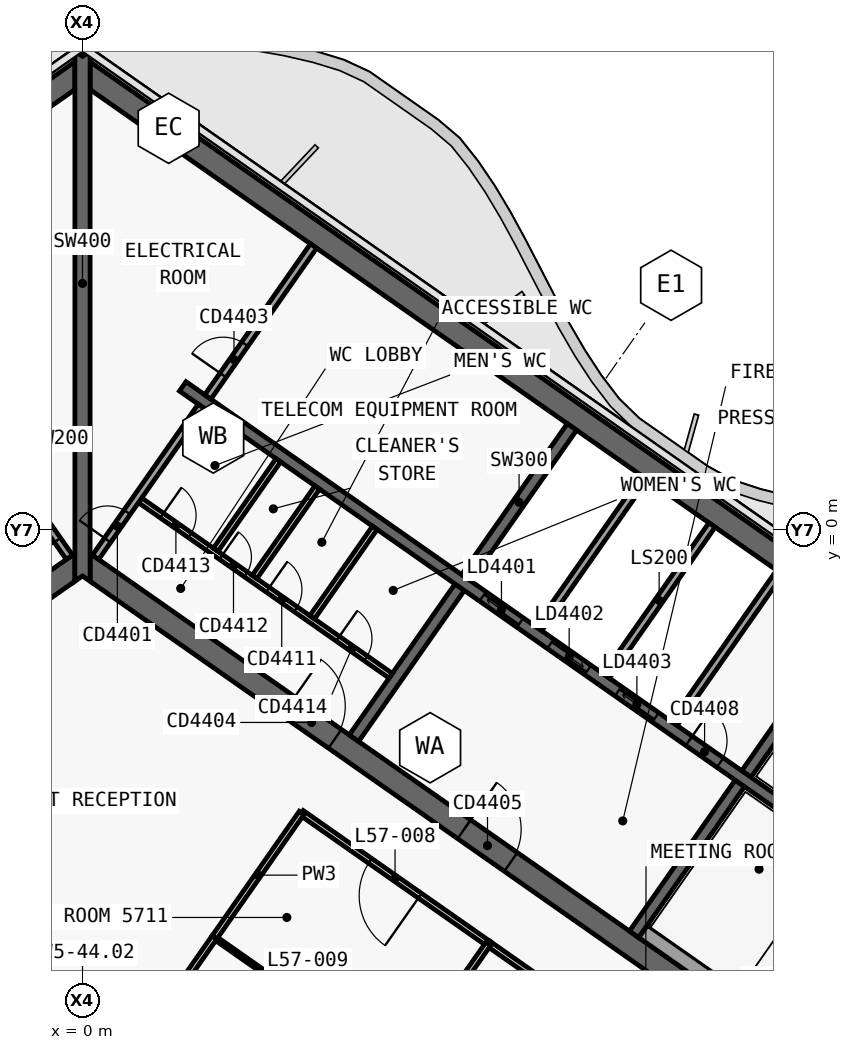
"""IFC4 building model, lengths in metres.
Left out: names, types, materials, properties, quantities, classifications, styles, units other than length and angle.
Written with IfcOpenShell. Run it as: python <this file> out.ifc"""

import sys

from ifc_helpers import new_model, si_unit, direction, frame, frame_2d, origin, place, context, subcontext, project, spatial, polyline, rectangle, outline, extrude, element, fill, save


model = new_model("IFC4")
c1 = context("Model", 3, precision=1e-05, world=origin(), true_north=direction((0.0, 1.0)))
c2 = subcontext(c1, "Body", "Model", "MODEL_VIEW")
j1 = project(units=[si_unit("LENGTHUNIT", "METRE"), si_unit("PLANEANGLEUNIT", "RADIAN")], contexts=[c1])
p1 = place(None, origin())
s1 = spatial("IfcSite", under=j1, at=p1, CompositionType="ELEMENT")
p2 = place(p1, origin())
s2 = spatial("IfcBuilding", under=s1, at=p2, CompositionType="ELEMENT")
p3 = place(p2, frame((0.0, 0.0, 244.9)))
s3 = spatial("IfcBuildingStorey", under=s2, at=p3, CompositionType="ELEMENT", Elevation=244.9)
p4 = place(p3, frame((-0.028, 12.066, 0.0), z_axis=(0.0, 0.0, 1.0), x_axis=(-0.819151382952, -0.573577380837, 0.0)))
e1 = element("IfcWall", 1, at=p4, inside=s3, PredefinedType="SHEAR", context=c2, shape_type="SweptSolid", body=[
    extrude(outline(polyline([(33.898, 0.3), (0.42, 0.3), (0.0, -0.3), (33.898, -0.3), (33.898, 0.3)])), origin(), (0.0, 0.0, 1.0), 3.9),
])
p5 = place(p3, frame((-0.028, -0.874, 0.0), z_axis=(0.0, 0.0, 1.0), x_axis=(-0.819150035022, -0.573579305871, 0.0)))
e2 = element("IfcWall", 2, at=p5, inside=s3, PredefinedType="SHEAR", context=c2, shape_type="SweptSolid", body=[
    extrude(outline(polyline([(26.476, 0.3), (0.42, 0.3), (0.0, -0.3), (26.476, -0.3), (26.476, 0.3)])), origin(), (0.0, 0.0, 1.0), 3.9),
])
p6 = place(p5, frame((2.976, 0.0, 0.0)))
e3 = element("IfcOpeningElement", 3, at=p6, cuts=e2, PredefinedType="OPENING", context=c2, shape_type="SweptSolid", body=[
    extrude(rectangle(XDim=2.4, YDim=2.1, at=frame_2d((1.2, 1.05))), frame((0.0, 0.31, 0.0), z_axis=(0.0, -1.0, 0.0), x_axis=(1.0, 0.0, 0.0)), (0.0, 0.0, 1.0), 0.62),
])
p7 = place(p5, frame((11.776, 0.0, 0.0)))
e4 = element("IfcOpeningElement", 4, at=p7, cuts=e2, PredefinedType="OPENING", context=c2, shape_type="SweptSolid", body=[
    extrude(rectangle(XDim=2.4, YDim=2.1, at=frame_2d((1.2, 1.05))), frame((0.0, 0.31, 0.0), z_axis=(0.0, -1.0, 0.0), x_axis=(1.0, 0.0, 0.0)), (0.0, 0.0, 1.0), 0.62),
])
p8 = place(p3, frame((0.028, 12.066, 0.0), z_axis=(0.0, 0.0, 1.0), x_axis=(0.819151382952, -0.573577380837, 0.0)))
e5 = element("IfcWall", 5, at=p8, inside=s3, PredefinedType="SHEAR", context=c2, shape_type="SweptSolid", body=[
    extrude(outline(polyline([(33.898, 0.3), (0.0, 0.3), (0.42, -0.3), (33.898, -0.3), (33.898, 0.3)])), origin(), (0.0, 0.0, 1.0), 3.9),
])
p9 = place(p3, frame((0.028, -0.874, 0.0), z_axis=(0.0, 0.0, 1.0), x_axis=(0.819150035022, -0.573579305871, 0.0)))
e6 = element("IfcWall", 6, at=p9, inside=s3, PredefinedType="SHEAR", context=c2, shape_type="SweptSolid", body=[
    extrude(outline(polyline([(26.476, 0.3), (0.0, 0.3), (0.42, -0.3), (26.476, -0.3), (26.476, 0.3)])), origin(), (0.0, 0.0, 1.0), 3.9),
])
p10 = place(p9, frame((6.576, 0.0, 0.0)))
e7 = element("IfcOpeningElement", 7, at=p10, cuts=e6, PredefinedType="OPENING", context=c2, shape_type="SweptSolid", body=[
    extrude(rectangle(XDim=1.5, YDim=2.1, at=frame_2d((0.75, 1.05))), frame((0.0, 0.31, 0.0), z_axis=(0.0, -1.0, 0.0), x_axis=(1.0, 0.0, 0.0)), (0.0, 0.0, 1.0), 0.62),
])
p11 = place(p9, frame((12.226, 0.0, 0.0)))
e8 = element("IfcOpeningElement", 8, at=p11, cuts=e6, PredefinedType="OPENING", context=c2, shape_type="SweptSolid", body=[
    extrude(rectangle(XDim=1.5, YDim=2.1, at=frame_2d((0.75, 1.05))), frame((0.0, 0.31, 0.0), z_axis=(0.0, -1.0, 0.0), x_axis=(1.0, 0.0, 0.0)), (0.0, 0.0, 1.0), 0.62),
])
p12 = place(p3, frame((7.143, -5.49, 0.0), z_axis=(0.0, 0.0, 1.0), x_axis=(0.573617744349, 0.819123118565, 0.0)))
e9 = element("IfcWall", 9, at=p12, inside=s3, PredefinedType="SHEAR", context=c2, shape_type="SweptSolid", body=[
    extrude(outline(polyline([(0.0, 0.15), (0.0, -0.15), (4.85, -0.15), (4.85, 0.15), (0.0, 0.15)])), origin(), (0.0, 0.0, 1.0), 3.9),
])
p13 = place(p3, frame((10.097, -1.271, 0.0), z_axis=(0.0, 0.0, 1.0), x_axis=(0.573560315113, 0.819163332265, 0.0)))
e10 = element("IfcWall", 10, at=p13, inside=s3, PredefinedType="SHEAR", context=c2, shape_type="SweptSolid", body=[
    extrude(outline(polyline([(4.85, -0.15), (4.85, 0.15), (0.0, 0.15), (0.0, -0.15), (4.85, -0.15)])), origin(), (0.0, 0.0, 1.0), 3.9),
])
p14 = place(p3, frame((14.515, -10.652, 0.0), z_axis=(0.0, 0.0, 1.0), x_axis=(0.573560315113, 0.819163332265, 0.0)))
e11 = element("IfcWall", 11, at=p14, inside=s3, PredefinedType="SHEAR", context=c2, shape_type="SweptSolid", body=[
    extrude(outline(polyline([(0.0, 0.15), (0.0, -0.15), (4.85, -0.15), (4.85, 0.15), (0.0, 0.15)])), origin(), (0.0, 0.0, 1.0), 3.9),
])
p15 = place(p3, frame((17.469, -6.433, 0.0), z_axis=(0.0, 0.0, 1.0), x_axis=(0.573594092424, 0.81913968109, 0.0)))
e12 = element("IfcWall", 12, at=p15, inside=s3, PredefinedType="SHEAR", context=c2, shape_type="SweptSolid", body=[
    extrude(outline(polyline([(4.85, -0.15), (4.85, 0.15), (0.0, 0.15), (0.0, -0.15), (4.85, -0.15)])), origin(), (0.0, 0.0, 1.0), 3.9),
])
p16 = place(p3, frame((2.638, 3.768, 0.0), z_axis=(0.0, 0.0, 1.0), x_axis=(0.819155014212, -0.573572194837, 0.0)))
e13 = element("IfcWall", 13, at=p16, inside=s3, PredefinedType="SHEAR", context=c2, shape_type="SweptSolid", body=[
    extrude(outline(polyline([(0.0, 0.15), (0.0, -0.15), (26.4, -0.15), (26.4, 0.15), (0.0, 0.15)])), origin(), (0.0, 0.0, 1.0), 3.9),
])
p17 = place(p16, frame((9.637, 0.0, 0.0)))
e14 = element("IfcOpeningElement", 14, at=p17, cuts=e13, PredefinedType="OPENING", context=c2, shape_type="SweptSolid", body=[
    extrude(rectangle(XDim=1.2, YDim=2.1, at=frame_2d((0.6, 1.05))), frame((0.0, 0.16, 0.0), z_axis=(0.0, -1.0, 0.0), x_axis=(1.0, 0.0, 0.0)), (0.0, 0.0, 1.0), 0.32),
])
p18 = place(p16, frame((11.812, 0.0, 0.0)))
e15 = element("IfcOpeningElement", 15, at=p18, cuts=e13, PredefinedType="OPENING", context=c2, shape_type="SweptSolid", body=[
    extrude(rectangle(XDim=1.2, YDim=2.1, at=frame_2d((0.6, 1.05))), frame((0.0, 0.16, 0.0), z_axis=(0.0, -1.0, 0.0), x_axis=(1.0, 0.0, 0.0)), (0.0, 0.0, 1.0), 0.32),
])
p19 = place(p16, frame((13.988, 0.0, 0.0)))
e16 = element("IfcOpeningElement", 16, at=p19, cuts=e13, PredefinedType="OPENING", context=c2, shape_type="SweptSolid", body=[
    extrude(rectangle(XDim=1.2, YDim=2.1, at=frame_2d((0.6, 1.05))), frame((0.0, 0.16, 0.0), z_axis=(0.0, -1.0, 0.0), x_axis=(1.0, 0.0, 0.0)), (0.0, 0.0, 1.0), 0.32),
])
p20 = place(p16, frame((16.262, 0.0, 0.0)))
e17 = element("IfcOpeningElement", 17, at=p20, cuts=e13, PredefinedType="OPENING", context=c2, shape_type="SweptSolid", body=[
    extrude(rectangle(XDim=1.0, YDim=2.1, at=frame_2d((0.5, 1.05))), frame((0.0, 0.16, 0.0), z_axis=(0.0, -1.0, 0.0), x_axis=(1.0, 0.0, 0.0)), (0.0, 0.0, 1.0), 0.32),
])
p21 = place(p3, frame((0.0, -1.361, 0.0), z_axis=(0.0, 0.0, 1.0), x_axis=(0.0, 1.0, 0.0)))
e18 = element("IfcWall", 18, at=p21, inside=s3, PredefinedType="SHEAR", context=c2, shape_type="SweptSolid", body=[
    extrude(outline(polyline([(0.14, 0.2), (0.0, 0.2), (0.14, 0.0), (0.0, -0.2), (0.14, -0.2), (1.012, -0.2), (12.94, -0.2), (13.813, -0.2), (13.893, -0.2), (13.933, -0.172), (13.813, 0.0), (13.933, 0.172), (13.893, 0.2), (13.813, 0.2), (12.94, 0.2), (1.012, 0.2), (0.14, 0.2)])), origin(), (0.0, 0.0, 1.0), 3.9),
])
p22 = place(p3, frame((12.001, -2.605, 0.0), z_axis=(0.0, 0.0, 1.0), x_axis=(0.573560315113, 0.819163332265, 0.0)))
e19 = element("IfcWall", 19, at=p22, inside=s3, PredefinedType="SOLIDWALL", context=c2, shape_type="SweptSolid", body=[
    extrude(rectangle(XDim=4.85, YDim=0.2, at=frame_2d((2.425, 0.0))), origin(), (0.0, 0.0, 1.0), 3.9),
])
p23 = place(p3, frame((13.783, -3.852, 0.0), z_axis=(0.0, 0.0, 1.0), x_axis=(0.573594092424, 0.81913968109, 0.0)))
e20 = element("IfcWall", 20, at=p23, inside=s3, PredefinedType="SOLIDWALL", context=c2, shape_type="SweptSolid", body=[
    extrude(rectangle(XDim=4.85, YDim=0.2, at=frame_2d((2.425, 0.0))), origin(), (0.0, 0.0, 1.0), 3.9),
])
p24 = place(p3, frame((15.565, -5.1, 0.0), z_axis=(0.0, 0.0, 1.0), x_axis=(0.573560315113, 0.819163332265, 0.0)))
e21 = element("IfcWall", 21, at=p24, inside=s3, PredefinedType="SOLIDWALL", context=c2, shape_type="SweptSolid", body=[
    extrude(rectangle(XDim=4.85, YDim=0.2, at=frame_2d((2.425, 0.0))), origin(), (0.0, 0.0, 1.0), 3.9),
])
p25 = place(p3, frame((1.516, 0.77, 0.0), z_axis=(0.0, 0.0, 1.0), x_axis=(0.819146424436, -0.573584462249, 0.0)))
e22 = element("IfcWall", 22, at=p25, inside=s3, PredefinedType="PARTITIONING", context=c2, shape_type="SweptSolid", body=[
    extrude(rectangle(XDim=8.05, YDim=0.15, at=frame_2d((4.025, 0.0))), origin(), (0.0, 0.0, 1.0), 3.62),
])
p26 = place(p25, frame((0.7, 0.0, 0.0)))
e23 = element("IfcOpeningElement", 23, at=p26, cuts=e22, PredefinedType="OPENING", context=c2, shape_type="SweptSolid", body=[
    extrude(rectangle(XDim=0.9, YDim=2.1, at=frame_2d((0.45, 1.05))), frame((0.0, 0.085, 0.0), z_axis=(0.0, -1.0, 0.0), x_axis=(1.0, 0.0, 0.0)), (0.0, 0.0, 1.0), 0.17),
])
p27 = place(p25, frame((2.6, 0.0, 0.0)))
e24 = element("IfcOpeningElement", 24, at=p27, cuts=e22, PredefinedType="OPENING", context=c2, shape_type="SweptSolid", body=[
    extrude(rectangle(XDim=0.8, YDim=2.1, at=frame_2d((0.4, 1.05))), frame((0.0, 0.085, 0.0), z_axis=(0.0, -1.0, 0.0), x_axis=(1.0, 0.0, 0.0)), (0.0, 0.0, 1.0), 0.17),
])
p28 = place(p25, frame((4.1, 0.0, 0.0)))
e25 = element("IfcOpeningElement", 25, at=p28, cuts=e22, PredefinedType="OPENING", context=c2, shape_type="SweptSolid", body=[
    extrude(rectangle(XDim=0.9, YDim=2.1, at=frame_2d((0.45, 1.05))), frame((0.0, 0.085, 0.0), z_axis=(0.0, -1.0, 0.0), x_axis=(1.0, 0.0, 0.0)), (0.0, 0.0, 1.0), 0.17),
])
p29 = place(p25, frame((6.35, 0.0, 0.0)))
e26 = element("IfcOpeningElement", 26, at=p29, cuts=e22, PredefinedType="OPENING", context=c2, shape_type="SweptSolid", body=[
    extrude(rectangle(XDim=0.9, YDim=2.1, at=frame_2d((0.45, 1.05))), frame((0.0, 0.085, 0.0), z_axis=(0.0, -1.0, 0.0), x_axis=(1.0, 0.0, 0.0)), (0.0, 0.0, 1.0), 0.17),
])
p30 = place(p3, frame((3.504, -0.531, 0.0), z_axis=(0.0, 0.0, 1.0), x_axis=(0.573582013179, 0.819148139324, 0.0)))
e27 = element("IfcWall", 27, at=p30, inside=s3, PredefinedType="PARTITIONING", context=c2, shape_type="SweptSolid", body=[
    extrude(rectangle(XDim=2.875, YDim=0.15, at=frame_2d((1.438, 0.0))), origin(), (0.0, 0.0, 1.0), 3.62),
])
p31 = place(p3, frame((4.528, -1.248, 0.0), z_axis=(0.0, 0.0, 1.0), x_axis=(0.573621911162, 0.819120200602, 0.0)))
e28 = element("IfcWall", 28, at=p31, inside=s3, PredefinedType="PARTITIONING", context=c2, shape_type="SweptSolid", body=[
    extrude(rectangle(XDim=2.875, YDim=0.15, at=frame_2d((1.438, 0.0))), origin(), (0.0, 0.0, 1.0), 3.62),
])
p32 = place(p3, frame((6.044, -2.309, 0.0), z_axis=(0.0, 0.0, 1.0), x_axis=(0.573564930514, 0.819160100642, 0.0)))
e29 = element("IfcWall", 29, at=p32, inside=s3, PredefinedType="PARTITIONING", context=c2, shape_type="SweptSolid", body=[
    extrude(rectangle(XDim=2.875, YDim=0.15, at=frame_2d((1.438, 0.0))), origin(), (0.0, 0.0, 1.0), 3.62),
])
p33 = place(p3, frame((14.753, -10.574, 0.0), z_axis=(0.0, 0.0, 1.0), x_axis=(0.819158229677, -0.573567602601, 0.0)))
e30 = element("IfcWall", 30, at=p33, inside=s3, PredefinedType="SOLIDWALL", context=c2, shape_type="SweptSolid", body=[
    extrude(rectangle(XDim=8.25, YDim=0.4, at=frame_2d((4.125, 0.0))), origin(), (0.0, 0.0, 1.0), 3.62),
])
p34 = place(p3, frame((-0.344, -0.729, 0.0), z_axis=(0.0, 0.0, 1.0), x_axis=(-0.573560315113, 0.819163332265, 0.0)))
e31 = element("IfcWall", 31, at=p34, inside=s3, PredefinedType="SOLIDWALL", context=c2, shape_type="SweptSolid", body=[
    extrude(rectangle(XDim=4.85, YDim=0.2, at=frame_2d((2.425, 0.0))), origin(), (0.0, 0.0, 1.0), 3.62),
])
p35 = place(p34, frame((0.55, 0.0, 0.0)))
e32 = element("IfcOpeningElement", 32, at=p35, cuts=e31, PredefinedType="OPENING", context=c2, shape_type="SweptSolid", body=[
    extrude(rectangle(XDim=0.9, YDim=2.1, at=frame_2d((0.45, 1.05))), frame((0.0, 0.11, 0.0), z_axis=(0.0, -1.0, 0.0), x_axis=(1.0, 0.0, 0.0)), (0.0, 0.0, 1.0), 0.22),
])
p36 = place(p3, frame((0.344, -0.729, 0.0), z_axis=(0.0, 0.0, 1.0), x_axis=(0.573560315113, 0.819163332265, 0.0)))
e33 = element("IfcWall", 33, at=p36, inside=s3, PredefinedType="SOLIDWALL", context=c2, shape_type="SweptSolid", body=[
    extrude(rectangle(XDim=4.85, YDim=0.2, at=frame_2d((2.425, 0.0))), origin(), (0.0, 0.0, 1.0), 3.62),
])
p37 = place(p36, frame((0.55, 0.0, 0.0)))
e34 = element("IfcOpeningElement", 34, at=p37, cuts=e33, PredefinedType="OPENING", context=c2, shape_type="SweptSolid", body=[
    extrude(rectangle(XDim=0.9, YDim=2.1, at=frame_2d((0.45, 1.05))), frame((0.0, 0.11, 0.0), z_axis=(0.0, -1.0, 0.0), x_axis=(1.0, 0.0, 0.0)), (0.0, 0.0, 1.0), 0.22),
])
p38 = place(p3, frame((3.298, 3.49, 0.0), z_axis=(0.0, 0.0, 1.0), x_axis=(0.573560315113, 0.819163332265, 0.0)))
e35 = element("IfcWall", 35, at=p38, inside=s3, PredefinedType="SOLIDWALL", context=c2, shape_type="SweptSolid", body=[
    extrude(rectangle(XDim=4.85, YDim=0.2, at=frame_2d((2.425, 0.0))), origin(), (0.0, 0.0, 1.0), 3.62),
])
p39 = place(p38, frame((0.7, 0.0, 0.0)))
e36 = element("IfcOpeningElement", 36, at=p39, cuts=e35, PredefinedType="OPENING", context=c2, shape_type="SweptSolid", body=[
    extrude(rectangle(XDim=1.0, YDim=2.1, at=frame_2d((0.5, 1.05))), frame((0.0, 0.11, 0.0), z_axis=(0.0, -1.0, 0.0), x_axis=(1.0, 0.0, 0.0)), (0.0, 0.0, 1.0), 0.22),
])
p40 = place(p3, frame((10.683, -10.898, 0.0), z_axis=(0.0, 0.0, 1.0), x_axis=(-0.819147828287, 0.573582457378, 0.0)))
e37 = element("IfcWall", 37, at=p40, inside=s3, PredefinedType="PARTITIONING", context=c2, shape_type="SweptSolid", body=[
    extrude(rectangle(XDim=6.002, YDim=0.15, at=frame_2d((3.001, 0.0))), origin(), (0.0, 0.0, 1.0), 3.05),
])
p41 = place(p40, frame((2.201, 0.0, 0.0)))
e38 = element("IfcOpeningElement", 38, at=p41, cuts=e37, PredefinedType="OPENING", context=c2, shape_type="SweptSolid", body=[
    extrude(rectangle(XDim=1.6, YDim=2.1, at=frame_2d((0.8, 1.05))), frame((0.0, 0.085, 0.0), z_axis=(0.0, -1.0, 0.0), x_axis=(1.0, 0.0, 0.0)), (0.0, 0.0, 1.0), 0.17),
])
p42 = place(p3, frame((16.826, -15.2, 0.0), z_axis=(0.0, 0.0, 1.0), x_axis=(-0.819138671238, 0.573595534573, 0.0)))
e39 = element("IfcWall", 39, at=p42, inside=s3, PredefinedType="PARTITIONING", context=c2, shape_type="SweptSolid", body=[
    extrude(rectangle(XDim=7.504, YDim=0.15, at=frame_2d((3.752, 0.0))), origin(), (0.0, 0.0, 1.0), 3.05),
])
p43 = place(p42, frame((2.952, 0.0, 0.0)))
e40 = element("IfcOpeningElement", 40, at=p43, cuts=e39, PredefinedType="OPENING", context=c2, shape_type="SweptSolid", body=[
    extrude(rectangle(XDim=1.6, YDim=2.1, at=frame_2d((0.8, 1.05))), frame((0.0, 0.085, 0.0), z_axis=(0.0, -1.0, 0.0), x_axis=(1.0, 0.0, 0.0)), (0.0, 0.0, 1.0), 0.17),
])
p44 = place(p3, frame((8.386, -14.175, 0.0), z_axis=(0.0, 0.0, 1.0), x_axis=(-0.819143979704, 0.5735879536, 0.0)))
e41 = element("IfcWall", 41, at=p44, inside=s3, PredefinedType="PARTITIONING", context=c2, shape_type="SweptSolid", body=[
    extrude(rectangle(XDim=6.0, YDim=0.1, at=frame_2d((3.0, 0.0))), origin(), (0.0, 0.0, 1.0), 3.05),
])
p45 = place(p44, frame((2.55, 0.0, 0.0)))
e42 = element("IfcOpeningElement", 42, at=p45, cuts=e41, PredefinedType="OPENING", context=c2, shape_type="SweptSolid", body=[
    extrude(rectangle(XDim=0.9, YDim=2.1, at=frame_2d((0.45, 1.05))), frame((0.0, 0.06, 0.0), z_axis=(0.0, -1.0, 0.0), x_axis=(1.0, 0.0, 0.0)), (0.0, 0.0, 1.0), 0.12),
])
p46 = place(p3, frame((1.849, -13.051, 0.0), z_axis=(0.0, 0.0, 1.0), x_axis=(0.573555012677, 0.819167044889, 0.0)))
e43 = element("IfcWall", 43, at=p46, inside=s3, PredefinedType="PARTITIONING", context=c2, shape_type="SweptSolid", body=[
    extrude(rectangle(XDim=2.829, YDim=0.15, at=frame_2d((1.415, 0.0))), origin(), (0.0, 0.0, 1.0), 3.05),
])
p47 = place(p3, frame((10.681, -10.897, 0.0), z_axis=(0.0, 0.0, 1.0), x_axis=(-0.57356603932, -0.81915932427, 0.0)))
e44 = element("IfcWall", 44, at=p47, inside=s3, PredefinedType="PARTITIONING", context=c2, shape_type="SweptSolid", body=[
    extrude(rectangle(XDim=3.002, YDim=0.15, at=frame_2d((1.501, 0.0))), origin(), (0.0, 0.0, 1.0), 3.62),
])
p48 = place(p3, frame((3.472, -10.732, 0.0), z_axis=(0.0, 0.0, 1.0), x_axis=(0.573597512525, 0.819137286189, 0.0)))
e45 = element("IfcWall", 45, at=p48, inside=s3, PredefinedType="PARTITIONING", context=c2, shape_type="SweptSolid", body=[
    extrude(rectangle(XDim=4.0, YDim=0.15, at=frame_2d((2.0, 0.0))), origin(), (0.0, 0.0, 1.0), 3.05),
])
p49 = place(p17, origin())
e46 = element("IfcDoor", 46, at=p49, inside=s3, OperationType="SLIDING_TO_LEFT", PredefinedType="DOOR", context=c2, shape_type="SweptSolid", body=[
    extrude(rectangle(XDim=1.2, YDim=2.1, at=frame_2d((0.6, 1.05))), frame((0.0, 0.025, 0.0), z_axis=(0.0, -1.0, 0.0), x_axis=(1.0, 0.0, 0.0)), (0.0, 0.0, 1.0), 0.05),
])
fill(e14, e46)
p50 = place(p18, origin())
e47 = element("IfcDoor", 47, at=p50, inside=s3, OperationType="SLIDING_TO_RIGHT", PredefinedType="DOOR", context=c2, shape_type="SweptSolid", body=[
    extrude(rectangle(XDim=1.2, YDim=2.1, at=frame_2d((0.6, 1.05))), frame((0.0, 0.025, 0.0), z_axis=(0.0, -1.0, 0.0), x_axis=(1.0, 0.0, 0.0)), (0.0, 0.0, 1.0), 0.05),
])
fill(e15, e47)
p51 = place(p19, origin())
e48 = element("IfcDoor", 48, at=p51, inside=s3, OperationType="SLIDING_TO_LEFT", PredefinedType="DOOR", context=c2, shape_type="SweptSolid", body=[
    extrude(rectangle(XDim=1.2, YDim=2.1, at=frame_2d((0.6, 1.05))), frame((0.0, 0.025, 0.0), z_axis=(0.0, -1.0, 0.0), x_axis=(1.0, 0.0, 0.0)), (0.0, 0.0, 1.0), 0.05),
])
fill(e16, e48)
p52 = place(p20, origin())
e49 = element("IfcDoor", 49, at=p52, inside=s3, OperationType="SINGLE_SWING_RIGHT", PredefinedType="DOOR", context=c2, shape_type="SweptSolid", body=[
    extrude(rectangle(XDim=1.0, YDim=2.1, at=frame_2d((0.5, 1.05))), frame((0.0, 0.025, 0.0), z_axis=(0.0, -1.0, 0.0), x_axis=(1.0, 0.0, 0.0)), (0.0, 0.0, 1.0), 0.05),
])
fill(e17, e49)
p53 = place(p26, origin())
e50 = element("IfcDoor", 50, at=p53, inside=s3, OperationType="SINGLE_SWING_RIGHT", PredefinedType="DOOR", context=c2, shape_type="SweptSolid", body=[
    extrude(rectangle(XDim=0.9, YDim=2.1, at=frame_2d((0.45, 1.05))), frame((0.0, 0.025, 0.0), z_axis=(0.0, -1.0, 0.0), x_axis=(1.0, 0.0, 0.0)), (0.0, 0.0, 1.0), 0.05),
])
fill(e23, e50)
p54 = place(p27, origin())
e51 = element("IfcDoor", 51, at=p54, inside=s3, OperationType="SINGLE_SWING_RIGHT", PredefinedType="DOOR", context=c2, shape_type="SweptSolid", body=[
    extrude(rectangle(XDim=0.8, YDim=2.1, at=frame_2d((0.4, 1.05))), frame((0.0, 0.025, 0.0), z_axis=(0.0, -1.0, 0.0), x_axis=(1.0, 0.0, 0.0)), (0.0, 0.0, 1.0), 0.05),
])
fill(e24, e51)
p55 = place(p28, origin())
e52 = element("IfcDoor", 52, at=p55, inside=s3, OperationType="SINGLE_SWING_RIGHT", PredefinedType="DOOR", context=c2, shape_type="SweptSolid", body=[
    extrude(rectangle(XDim=0.9, YDim=2.1, at=frame_2d((0.45, 1.05))), frame((0.0, 0.025, 0.0), z_axis=(0.0, -1.0, 0.0), x_axis=(1.0, 0.0, 0.0)), (0.0, 0.0, 1.0), 0.05),
])
fill(e25, e52)
p56 = place(p29, origin())
e53 = element("IfcDoor", 53, at=p56, inside=s3, OperationType="SINGLE_SWING_RIGHT", PredefinedType="DOOR", context=c2, shape_type="SweptSolid", body=[
    extrude(rectangle(XDim=0.9, YDim=2.1, at=frame_2d((0.45, 1.05))), frame((0.0, 0.025, 0.0), z_axis=(0.0, -1.0, 0.0), x_axis=(1.0, 0.0, 0.0)), (0.0, 0.0, 1.0), 0.05),
])
fill(e26, e53)
p57 = place(p10, origin())
e54 = element("IfcDoor", 54, at=p57, inside=s3, OperationType="SINGLE_SWING_RIGHT", PredefinedType="DOOR", context=c2, shape_type="SweptSolid", body=[
    extrude(rectangle(XDim=1.5, YDim=2.1, at=frame_2d((0.75, 1.05))), frame((0.0, 0.025, 0.0), z_axis=(0.0, -1.0, 0.0), x_axis=(1.0, 0.0, 0.0)), (0.0, 0.0, 1.0), 0.05),
])
fill(e7, e54)
p58 = place(p11, origin())
e55 = element("IfcDoor", 55, at=p58, inside=s3, OperationType="DOUBLE_DOOR_SINGLE_SWING", PredefinedType="DOOR", context=c2, shape_type="SweptSolid", body=[
    extrude(rectangle(XDim=1.5, YDim=2.1, at=frame_2d((0.75, 1.05))), frame((0.0, 0.025, 0.0), z_axis=(0.0, -1.0, 0.0), x_axis=(1.0, 0.0, 0.0)), (0.0, 0.0, 1.0), 0.05),
])
fill(e8, e55)
p59 = place(p35, origin())
e56 = element("IfcDoor", 56, at=p59, inside=s3, OperationType="SINGLE_SWING_RIGHT", PredefinedType="DOOR", context=c2, shape_type="SweptSolid", body=[
    extrude(rectangle(XDim=0.9, YDim=2.1, at=frame_2d((0.45, 1.05))), frame((0.0, 0.025, 0.0), z_axis=(0.0, -1.0, 0.0), x_axis=(1.0, 0.0, 0.0)), (0.0, 0.0, 1.0), 0.05),
])
fill(e32, e56)
p60 = place(p37, origin())
e57 = element("IfcDoor", 57, at=p60, inside=s3, OperationType="SINGLE_SWING_RIGHT", PredefinedType="DOOR", context=c2, shape_type="SweptSolid", body=[
    extrude(rectangle(XDim=0.9, YDim=2.1, at=frame_2d((0.45, 1.05))), frame((0.0, 0.025, 0.0), z_axis=(0.0, -1.0, 0.0), x_axis=(1.0, 0.0, 0.0)), (0.0, 0.0, 1.0), 0.05),
])
fill(e34, e57)
p61 = place(p39, origin())
e58 = element("IfcDoor", 58, at=p61, inside=s3, OperationType="SINGLE_SWING_RIGHT", PredefinedType="DOOR", context=c2, shape_type="SweptSolid", body=[
    extrude(rectangle(XDim=1.0, YDim=2.1, at=frame_2d((0.5, 1.05))), frame((0.0, 0.025, 0.0), z_axis=(0.0, -1.0, 0.0), x_axis=(1.0, 0.0, 0.0)), (0.0, 0.0, 1.0), 0.05),
])
fill(e36, e58)
p62 = place(p41, origin())
e59 = element("IfcDoor", 59, at=p62, inside=s3, OperationType="DOUBLE_DOOR_SINGLE_SWING", PredefinedType="DOOR", context=c2, shape_type="SweptSolid", body=[
    extrude(rectangle(XDim=1.6, YDim=2.1, at=frame_2d((0.8, 1.05))), frame((0.0, 0.025, 0.0), z_axis=(0.0, -1.0, 0.0), x_axis=(1.0, 0.0, 0.0)), (0.0, 0.0, 1.0), 0.05),
])
fill(e38, e59)
save(model, sys.argv[1])
